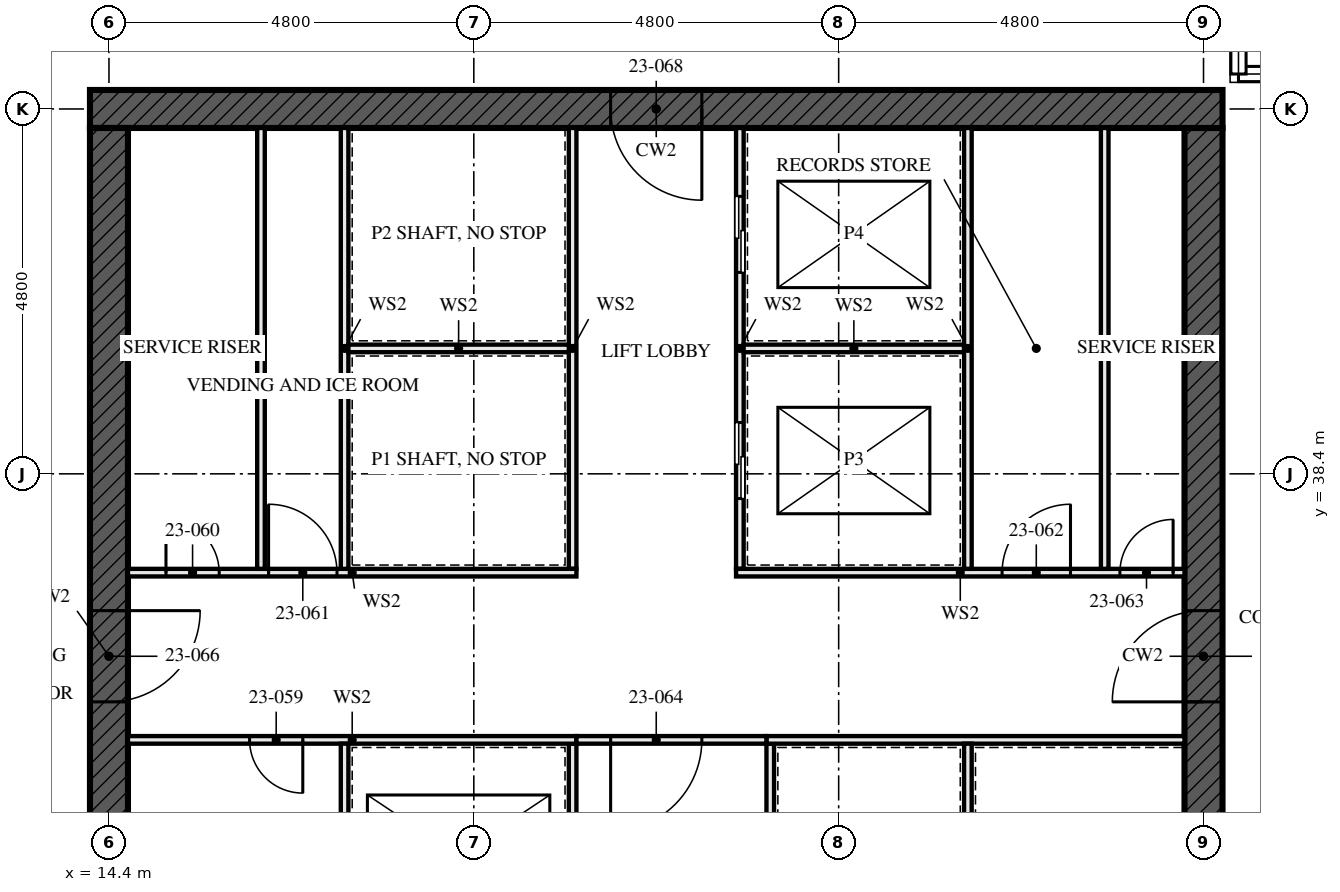
"""IFC4 building model, lengths in metres.
Left out: names, types, materials, properties, quantities, classifications, styles, units other than length and angle.
Written with IfcOpenShell. Run it as: python <this file> out.ifc"""

import sys

from ifc_helpers import new_model, si_unit, direction, frame, frame_2d, origin, place, context, subcontext, project, spatial, rectangle, extrude, element, fill, save


model = new_model("IFC4")
c1 = context("Model", 3, precision=1e-05, world=origin(), true_north=direction((0.0, 1.0)))
c2 = subcontext(c1, "Body", "Model", "MODEL_VIEW")
j1 = project(units=[si_unit("LENGTHUNIT", "METRE"), si_unit("PLANEANGLEUNIT", "RADIAN")], contexts=[c1])
p1 = place(None, origin())
s1 = spatial("IfcSite", under=j1, at=p1, CompositionType="ELEMENT")
p2 = place(p1, origin())
s2 = spatial("IfcBuilding", under=s1, at=p2, CompositionType="ELEMENT")
p3 = place(p2, frame((0.0, 0.0, 87.5)))
s3 = spatial("IfcBuildingStorey", under=s2, at=p3, CompositionType="ELEMENT", Elevation=87.5)
p4 = place(p3, frame((29.05, 43.2, -0.17), z_axis=(0.0, 0.0, 1.0), x_axis=(-1.0, 0.0, 0.0)))
e1 = element("IfcWall", 1, at=p4, inside=s3, PredefinedType="SHEAR", context=c2, shape_type="SweptSolid", body=[
    extrude(rectangle(XDim=14.9, YDim=0.5, at=frame_2d((7.45, 0.0))), origin(), (0.0, 0.0, 1.0), 3.5),
])
p5 = place(p4, frame((6.85, 0.0, 0.17)))
e2 = element("IfcOpeningElement", 2, at=p5, cuts=e1, PredefinedType="OPENING", context=c2, shape_type="SweptSolid", body=[
    extrude(rectangle(XDim=1.2, YDim=2.1, at=frame_2d((0.6, 1.05))), frame((0.0, 0.26, 0.0), z_axis=(0.0, -1.0, 0.0), x_axis=(1.0, 0.0, 0.0)), (0.0, 0.0, 1.0), 0.521),
])
p6 = place(p3, frame((14.4, 42.95, -0.17), z_axis=(0.0, 0.0, 1.0), x_axis=(0.0, -1.0, 0.0)))
e3 = element("IfcWall", 3, at=p6, inside=s3, PredefinedType="SHEAR", context=c2, shape_type="SweptSolid", body=[
    extrude(rectangle(XDim=13.9, YDim=0.5, at=frame_2d((6.95, 0.0))), origin(), (0.0, 0.0, 1.0), 3.5),
])
p7 = place(p6, frame((6.35, 0.0, 0.17)))
e4 = element("IfcOpeningElement", 4, at=p7, cuts=e3, PredefinedType="OPENING", context=c2, shape_type="SweptSolid", body=[
    extrude(rectangle(XDim=1.2, YDim=2.1, at=frame_2d((0.6, 1.05))), frame((0.0, 0.26, 0.0), z_axis=(0.0, -1.0, 0.0), x_axis=(1.0, 0.0, 0.0)), (0.0, 0.0, 1.0), 0.521),
])
p8 = place(p3, frame((28.8, 29.05, -0.17), z_axis=(0.0, 0.0, 1.0), x_axis=(0.0, 1.0, 0.0)))
e5 = element("IfcWall", 5, at=p8, inside=s3, PredefinedType="SHEAR", context=c2, shape_type="SweptSolid", body=[
    extrude(rectangle(XDim=13.9, YDim=0.5, at=frame_2d((6.95, 0.0))), origin(), (0.0, 0.0, 1.0), 3.5),
])
p9 = place(p8, frame((6.35, 0.0, 0.17)))
e6 = element("IfcOpeningElement", 6, at=p9, cuts=e5, PredefinedType="OPENING", context=c2, shape_type="SweptSolid", body=[
    extrude(rectangle(XDim=1.2, YDim=2.1, at=frame_2d((0.6, 1.05))), frame((0.0, 0.26, 0.0), z_axis=(0.0, -1.0, 0.0), x_axis=(1.0, 0.0, 0.0)), (0.0, 0.0, 1.0), 0.521),
])
for number, where, z_axis, x_axis in (
    (7, (16.4, 37.15, 0.0), (0.0, 0.0, 1.0), (0.0, 1.0, 0.0)),
    (8, (27.5, 37.15, 0.0), (0.0, 0.0, 1.0), (0.0, 1.0, 0.0)),
):
    element("IfcWall", number, at=place(p3, frame(where, z_axis=z_axis, x_axis=x_axis)), inside=s3, PredefinedType="SOLIDWALL", context=c2, shape_type="SweptSolid", body=[
        extrude(rectangle(XDim=5.8, YDim=0.1, at=frame_2d((2.9, 0.0))), origin(), (0.0, 0.0, 1.0), 3.33),
    ])
p10 = place(p3, frame((20.5, 29.05, 0.0), z_axis=(0.0, 0.0, 1.0), x_axis=(0.0, 1.0, 0.0)))
e9 = element("IfcWall", 9, at=p10, inside=s3, PredefinedType="SOLIDWALL", context=c2, shape_type="SweptSolid", body=[
    extrude(rectangle(XDim=5.8, YDim=0.1, at=frame_2d((2.9, 0.0))), origin(), (0.0, 0.0, 1.0), 3.33),
])
p11 = place(p10, frame((0.8, 0.0, 0.0)))
e10 = element("IfcOpeningElement", 10, at=p11, cuts=e9, PredefinedType="OPENING", context=c2, shape_type="SweptSolid", body=[
    extrude(rectangle(XDim=1.1, YDim=2.3, at=frame_2d((0.55, 1.15))), frame((0.0, 0.061, 0.0), z_axis=(0.0, -1.0, 0.0), x_axis=(1.0, 0.0, 0.0)), (0.0, 0.0, 1.0), 0.121),
])
p12 = place(p10, frame((3.775, 0.0, 0.0)))
e11 = element("IfcOpeningElement", 11, at=p12, cuts=e9, PredefinedType="OPENING", context=c2, shape_type="SweptSolid", body=[
    extrude(rectangle(XDim=1.1, YDim=2.3, at=frame_2d((0.55, 1.15))), frame((0.0, 0.061, 0.0), z_axis=(0.0, -1.0, 0.0), x_axis=(1.0, 0.0, 0.0)), (0.0, 0.0, 1.0), 0.121),
])
p13 = place(p3, frame((20.5, 37.15, 0.0), z_axis=(0.0, 0.0, 1.0), x_axis=(0.0, 1.0, 0.0)))
e12 = element("IfcWall", 12, at=p13, inside=s3, PredefinedType="SOLIDWALL", context=c2, shape_type="SweptSolid", body=[
    extrude(rectangle(XDim=5.8, YDim=0.1, at=frame_2d((2.9, 0.0))), origin(), (0.0, 0.0, 1.0), 3.33),
])
p14 = place(p3, frame((22.7, 37.15, 0.0), z_axis=(0.0, 0.0, 1.0), x_axis=(0.0, 1.0, 0.0)))
e13 = element("IfcWall", 13, at=p14, inside=s3, PredefinedType="SOLIDWALL", context=c2, shape_type="SweptSolid", body=[
    extrude(rectangle(XDim=5.8, YDim=0.1, at=frame_2d((2.9, 0.0))), origin(), (0.0, 0.0, 1.0), 3.33),
])
p15 = place(p14, frame((0.925, 0.0, 0.0)))
e14 = element("IfcOpeningElement", 14, at=p15, cuts=e13, PredefinedType="OPENING", context=c2, shape_type="SweptSolid", body=[
    extrude(rectangle(XDim=1.0, YDim=2.1, at=frame_2d((0.5, 1.05))), frame((0.0, 0.061, 0.0), z_axis=(0.0, -1.0, 0.0), x_axis=(1.0, 0.0, 0.0)), (0.0, 0.0, 1.0), 0.121),
])
p16 = place(p14, frame((3.9, 0.0, 0.0)))
e15 = element("IfcOpeningElement", 15, at=p16, cuts=e13, PredefinedType="OPENING", context=c2, shape_type="SweptSolid", body=[
    extrude(rectangle(XDim=1.0, YDim=2.1, at=frame_2d((0.5, 1.05))), frame((0.0, 0.061, 0.0), z_axis=(0.0, -1.0, 0.0), x_axis=(1.0, 0.0, 0.0)), (0.0, 0.0, 1.0), 0.121),
])
p17 = place(p3, frame((23.1, 29.05, 0.0), z_axis=(0.0, 0.0, 1.0), x_axis=(0.0, 1.0, 0.0)))
e16 = element("IfcWall", 16, at=p17, inside=s3, PredefinedType="SOLIDWALL", context=c2, shape_type="SweptSolid", body=[
    extrude(rectangle(XDim=5.8, YDim=0.1, at=frame_2d((2.9, 0.0))), origin(), (0.0, 0.0, 1.0), 3.33),
])
p18 = place(p17, frame((1.0, 0.0, 0.0)))
e17 = element("IfcOpeningElement", 17, at=p18, cuts=e16, PredefinedType="OPENING", context=c2, shape_type="SweptSolid", body=[
    extrude(rectangle(XDim=0.7, YDim=2.1, at=frame_2d((0.35, 1.05))), frame((0.0, 0.061, 0.0), z_axis=(0.0, -1.0, 0.0), x_axis=(1.0, 0.0, 0.0)), (0.0, 0.0, 1.0), 0.121),
])
p19 = place(p3, frame((14.65, 34.9, 0.0), z_axis=(0.0, 0.0, 1.0), x_axis=(1.0, 0.0, 0.0)))
e18 = element("IfcWall", 18, at=p19, inside=s3, PredefinedType="SOLIDWALL", context=c2, shape_type="SweptSolid", body=[
    extrude(rectangle(XDim=5.9, YDim=0.1, at=frame_2d((2.95, 0.0))), origin(), (0.0, 0.0, 1.0), 3.33),
])
p20 = place(p19, frame((1.6, 0.0, 0.0)))
e19 = element("IfcOpeningElement", 19, at=p20, cuts=e18, PredefinedType="OPENING", context=c2, shape_type="SweptSolid", body=[
    extrude(rectangle(XDim=0.7, YDim=2.1, at=frame_2d((0.35, 1.05))), frame((0.0, 0.061, 0.0), z_axis=(0.0, -1.0, 0.0), x_axis=(1.0, 0.0, 0.0)), (0.0, 0.0, 1.0), 0.121),
])
p21 = place(p3, frame((23.05, 34.9, 0.0), z_axis=(0.0, 0.0, 1.0), x_axis=(1.0, 0.0, 0.0)))
e20 = element("IfcWall", 20, at=p21, inside=s3, PredefinedType="SOLIDWALL", context=c2, shape_type="SweptSolid", body=[
    extrude(rectangle(XDim=5.5, YDim=0.1, at=frame_2d((2.75, 0.0))), origin(), (0.0, 0.0, 1.0), 3.33),
])
p22 = place(p3, frame((14.65, 37.1, 0.0), z_axis=(0.0, 0.0, 1.0), x_axis=(1.0, 0.0, 0.0)))
e21 = element("IfcWall", 21, at=p22, inside=s3, PredefinedType="SOLIDWALL", context=c2, shape_type="SweptSolid", body=[
    extrude(rectangle(XDim=5.9, YDim=0.1, at=frame_2d((2.95, 0.0))), origin(), (0.0, 0.0, 1.0), 3.33),
])
p23 = place(p22, frame((0.5, 0.0, 0.0)))
e22 = element("IfcOpeningElement", 22, at=p23, cuts=e21, PredefinedType="OPENING", context=c2, shape_type="SweptSolid", body=[
    extrude(rectangle(XDim=0.7, YDim=2.1, at=frame_2d((0.35, 1.05))), frame((0.0, 0.061, 0.0), z_axis=(0.0, -1.0, 0.0), x_axis=(1.0, 0.0, 0.0)), (0.0, 0.0, 1.0), 0.121),
])
p24 = place(p22, frame((1.85, 0.0, 0.0)))
e23 = element("IfcOpeningElement", 23, at=p24, cuts=e21, PredefinedType="OPENING", context=c2, shape_type="SweptSolid", body=[
    extrude(rectangle(XDim=0.9, YDim=2.1, at=frame_2d((0.45, 1.05))), frame((0.0, 0.061, 0.0), z_axis=(0.0, -1.0, 0.0), x_axis=(1.0, 0.0, 0.0)), (0.0, 0.0, 1.0), 0.121),
])
p25 = place(p3, frame((22.65, 37.1, 0.0), z_axis=(0.0, 0.0, 1.0), x_axis=(1.0, 0.0, 0.0)))
e24 = element("IfcWall", 24, at=p25, inside=s3, PredefinedType="SOLIDWALL", context=c2, shape_type="SweptSolid", body=[
    extrude(rectangle(XDim=5.9, YDim=0.1, at=frame_2d((2.95, 0.0))), origin(), (0.0, 0.0, 1.0), 3.33),
])
p26 = place(p25, frame((3.5, 0.0, 0.0)))
e25 = element("IfcOpeningElement", 25, at=p26, cuts=e24, PredefinedType="OPENING", context=c2, shape_type="SweptSolid", body=[
    extrude(rectangle(XDim=0.9, YDim=2.1, at=frame_2d((0.45, 1.05))), frame((0.0, 0.061, 0.0), z_axis=(0.0, -1.0, 0.0), x_axis=(1.0, 0.0, 0.0)), (0.0, 0.0, 1.0), 0.121),
])
p27 = place(p25, frame((5.05, 0.0, 0.0)))
e26 = element("IfcOpeningElement", 26, at=p27, cuts=e24, PredefinedType="OPENING", context=c2, shape_type="SweptSolid", body=[
    extrude(rectangle(XDim=0.7, YDim=2.1, at=frame_2d((0.35, 1.05))), frame((0.0, 0.061, 0.0), z_axis=(0.0, -1.0, 0.0), x_axis=(1.0, 0.0, 0.0)), (0.0, 0.0, 1.0), 0.121),
])
p28 = place(p3, frame((20.55, 34.9, 0.0), z_axis=(0.0, 0.0, 1.0), x_axis=(1.0, 0.0, 0.0)))
e27 = element("IfcWall", 27, at=p28, inside=s3, PredefinedType="SOLIDWALL", context=c2, shape_type="SweptSolid", body=[
    extrude(rectangle(XDim=2.5, YDim=0.1, at=frame_2d((1.25, 0.0))), origin(), (0.0, 0.0, 1.0), 3.33),
])
p29 = place(p28, frame((0.45, 0.0, 0.0)))
e28 = element("IfcOpeningElement", 28, at=p29, cuts=e27, PredefinedType="OPENING", context=c2, shape_type="SweptSolid", body=[
    extrude(rectangle(XDim=1.2, YDim=2.1, at=frame_2d((0.6, 1.05))), frame((0.0, 0.061, 0.0), z_axis=(0.0, -1.0, 0.0), x_axis=(1.0, 0.0, 0.0)), (0.0, 0.0, 1.0), 0.121),
])
for number, where, z_axis, x_axis in (
    (29, (17.5, 29.05, 0.0), (0.0, 0.0, 1.0), (0.0, 1.0, 0.0)),
    (30, (17.5, 37.15, 0.0), (0.0, 0.0, 1.0), (0.0, 1.0, 0.0)),
):
    element("IfcWall", number, at=place(p3, frame(where, z_axis=z_axis, x_axis=x_axis)), inside=s3, PredefinedType="SOLIDWALL", context=c2, shape_type="SweptSolid", body=[
        extrude(rectangle(XDim=5.8, YDim=0.1, at=frame_2d((2.9, 0.0))), origin(), (0.0, 0.0, 1.0), 3.33),
    ])
for number, where, z_axis, x_axis in (
    (31, (17.55, 40.05, 0.0), (0.0, 0.0, 1.0), (1.0, 0.0, 0.0)),
    (32, (22.75, 40.05, 0.0), (0.0, 0.0, 1.0), (1.0, 0.0, 0.0)),
):
    element("IfcWall", number, at=place(p3, frame(where, z_axis=z_axis, x_axis=x_axis)), inside=s3, PredefinedType="SOLIDWALL", context=c2, shape_type="SweptSolid", body=[
        extrude(rectangle(XDim=2.9, YDim=0.1, at=frame_2d((1.45, 0.0))), origin(), (0.0, 0.0, 1.0), 3.33),
    ])
p30 = place(p3, frame((25.7, 37.15, 0.0), z_axis=(0.0, 0.0, 1.0), x_axis=(0.0, 1.0, 0.0)))
e33 = element("IfcWall", 33, at=p30, inside=s3, PredefinedType="SOLIDWALL", context=c2, shape_type="SweptSolid", body=[
    extrude(rectangle(XDim=5.8, YDim=0.1, at=frame_2d((2.9, 0.0))), origin(), (0.0, 0.0, 1.0), 3.33),
])
p31 = place(p3, frame((25.7, 31.95, 0.0), z_axis=(0.0, 0.0, 1.0), x_axis=(0.0, 1.0, 0.0)))
e34 = element("IfcWall", 34, at=p31, inside=s3, PredefinedType="SOLIDWALL", context=c2, shape_type="SweptSolid", body=[
    extrude(rectangle(XDim=2.9, YDim=0.1, at=frame_2d((1.45, 0.0))), origin(), (0.0, 0.0, 1.0), 3.33),
])
p32 = place(p15, origin())
e35 = element("IfcDoor", 35, at=p32, inside=s3, OperationType="SLIDING_TO_LEFT", PredefinedType="DOOR", context=c2, shape_type="SweptSolid", body=[
    extrude(rectangle(XDim=1.0, YDim=2.1, at=frame_2d((0.5, 1.05))), frame((0.0, 0.05, 0.0), z_axis=(0.0, -1.0, 0.0), x_axis=(1.0, 0.0, 0.0)), (0.0, 0.0, 1.0), 0.1),
])
fill(e14, e35)
p33 = place(p16, origin())
e36 = element("IfcDoor", 36, at=p33, inside=s3, OperationType="SLIDING_TO_LEFT", PredefinedType="DOOR", context=c2, shape_type="SweptSolid", body=[
    extrude(rectangle(XDim=1.0, YDim=2.1, at=frame_2d((0.5, 1.05))), frame((0.0, 0.05, 0.0), z_axis=(0.0, -1.0, 0.0), x_axis=(1.0, 0.0, 0.0)), (0.0, 0.0, 1.0), 0.1),
])
fill(e15, e36)
p34 = place(p20, frame((0.7, 0.0, 0.0), z_axis=(0.0, 0.0, 1.0), x_axis=(-1.0, 0.0, 0.0)))
e37 = element("IfcDoor", 37, at=p34, inside=s3, OperationType="SINGLE_SWING_RIGHT", PredefinedType="DOOR", context=c2, shape_type="SweptSolid", body=[
    extrude(rectangle(XDim=0.7, YDim=2.1, at=frame_2d((0.35, 1.05))), frame((0.0, 0.027, 0.0), z_axis=(0.0, -1.0, 0.0), x_axis=(1.0, 0.0, 0.0)), (0.0, 0.0, 1.0), 0.054),
])
fill(e19, e37)
p35 = place(p23, origin())
e38 = element("IfcDoor", 38, at=p35, inside=s3, OperationType="SINGLE_SWING_RIGHT", PredefinedType="DOOR", context=c2, shape_type="SweptSolid", body=[
    extrude(rectangle(XDim=0.7, YDim=2.1, at=frame_2d((0.35, 1.05))), frame((0.0, 0.027, 0.0), z_axis=(0.0, -1.0, 0.0), x_axis=(1.0, 0.0, 0.0)), (0.0, 0.0, 1.0), 0.054),
])
fill(e22, e38)
p36 = place(p24, origin())
e39 = element("IfcDoor", 39, at=p36, inside=s3, OperationType="SINGLE_SWING_RIGHT", PredefinedType="DOOR", context=c2, shape_type="SweptSolid", body=[
    extrude(rectangle(XDim=0.9, YDim=2.1, at=frame_2d((0.45, 1.05))), frame((0.0, 0.027, 0.0), z_axis=(0.0, -1.0, 0.0), x_axis=(1.0, 0.0, 0.0)), (0.0, 0.0, 1.0), 0.054),
])
fill(e23, e39)
p37 = place(p26, origin())
e40 = element("IfcDoor", 40, at=p37, inside=s3, OperationType="SINGLE_SWING_LEFT", PredefinedType="DOOR", context=c2, shape_type="SweptSolid", body=[
    extrude(rectangle(XDim=0.9, YDim=2.1, at=frame_2d((0.45, 1.05))), frame((0.0, 0.027, 0.0), z_axis=(0.0, -1.0, 0.0), x_axis=(1.0, 0.0, 0.0)), (0.0, 0.0, 1.0), 0.054),
])
fill(e25, e40)
p38 = place(p27, origin())
e41 = element("IfcDoor", 41, at=p38, inside=s3, OperationType="SINGLE_SWING_LEFT", PredefinedType="DOOR", context=c2, shape_type="SweptSolid", body=[
    extrude(rectangle(XDim=0.7, YDim=2.1, at=frame_2d((0.35, 1.05))), frame((0.0, 0.027, 0.0), z_axis=(0.0, -1.0, 0.0), x_axis=(1.0, 0.0, 0.0)), (0.0, 0.0, 1.0), 0.054),
])
fill(e26, e41)
p39 = place(p29, frame((1.2, 0.0, 0.0), z_axis=(0.0, 0.0, 1.0), x_axis=(-1.0, 0.0, 0.0)))
e42 = element("IfcDoor", 42, at=p39, inside=s3, OperationType="SINGLE_SWING_LEFT", PredefinedType="DOOR", context=c2, shape_type="SweptSolid", body=[
    extrude(rectangle(XDim=1.2, YDim=2.1, at=frame_2d((0.6, 1.05))), frame((0.0, 0.027, 0.0), z_axis=(0.0, -1.0, 0.0), x_axis=(1.0, 0.0, 0.0)), (0.0, 0.0, 1.0), 0.054),
])
fill(e28, e42)
p40 = place(p7, origin())
e43 = element("IfcDoor", 43, at=p40, inside=s3, OperationType="SINGLE_SWING_LEFT", PredefinedType="DOOR", context=c2, shape_type="SweptSolid", body=[
    extrude(rectangle(XDim=1.2, YDim=2.1, at=frame_2d((0.6, 1.05))), frame((0.0, 0.027, 0.0), z_axis=(0.0, -1.0, 0.0), x_axis=(1.0, 0.0, 0.0)), (0.0, 0.0, 1.0), 0.054),
])
fill(e4, e43)
p41 = place(p9, origin())
e44 = element("IfcDoor", 44, at=p41, inside=s3, OperationType="SINGLE_SWING_LEFT", PredefinedType="DOOR", context=c2, shape_type="SweptSolid", body=[
    extrude(rectangle(XDim=1.2, YDim=2.1, at=frame_2d((0.6, 1.05))), frame((0.0, 0.027, 0.0), z_axis=(0.0, -1.0, 0.0), x_axis=(1.0, 0.0, 0.0)), (0.0, 0.0, 1.0), 0.054),
])
fill(e6, e44)
p42 = place(p5, origin())
e45 = element("IfcDoor", 45, at=p42, inside=s3, OperationType="SINGLE_SWING_LEFT", PredefinedType="DOOR", context=c2, shape_type="SweptSolid", body=[
    extrude(rectangle(XDim=1.2, YDim=2.1, at=frame_2d((0.6, 1.05))), frame((0.0, 0.027, 0.0), z_axis=(0.0, -1.0, 0.0), x_axis=(1.0, 0.0, 0.0)), (0.0, 0.0, 1.0), 0.054),
])
fill(e2, e45)
save(model, sys.argv[1])
